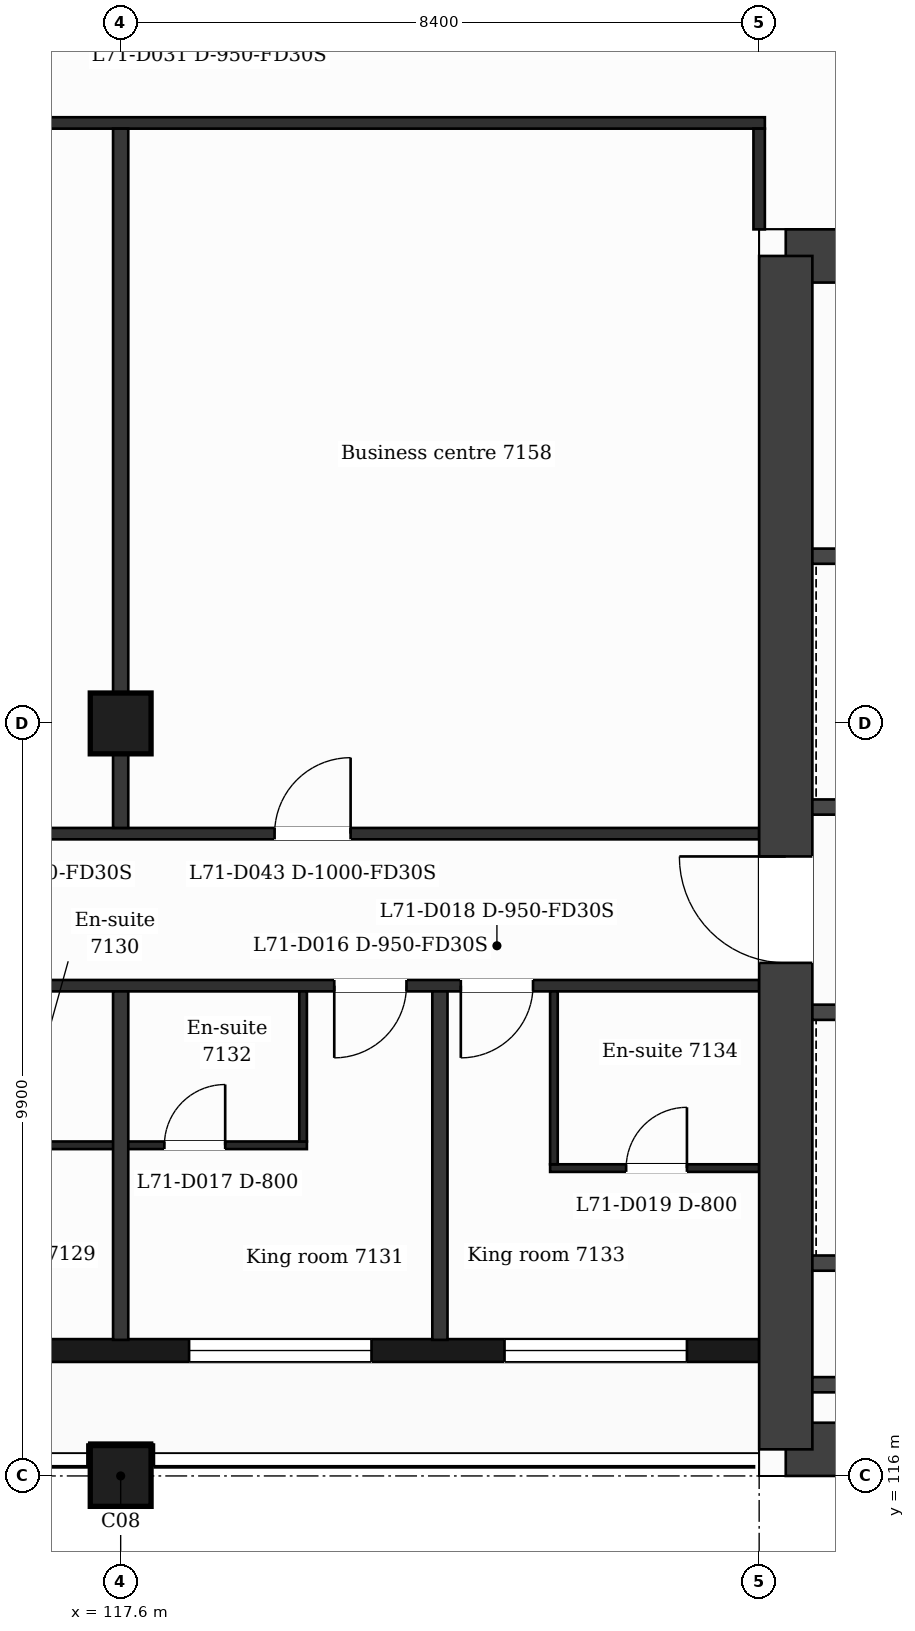
"""IFC4 building model, lengths in metres.
Left out: names, types, materials, properties, quantities, classifications, styles, units other than length and angle.
Written with IfcOpenShell. Run it as: python <this file> out.ifc"""

import sys

from ifc_helpers import new_model, si_unit, direction, frame, frame_2d, origin, origin_2d, place, context, subcontext, project, spatial, rectangle, extrude, element, fill, save


model = new_model("IFC4")
c1 = context("Model", 3, precision=1e-05, world=origin(), true_north=direction((0.0, 1.0)))
c2 = subcontext(c1, "Body", "Model", "MODEL_VIEW")
j1 = project(units=[si_unit("LENGTHUNIT", "METRE"), si_unit("PLANEANGLEUNIT", "RADIAN")], contexts=[c1])
p1 = place(None, origin())
s1 = spatial("IfcSite", under=j1, at=p1, CompositionType="ELEMENT")
p2 = place(p1, origin())
s2 = spatial("IfcBuilding", under=s1, at=p2, CompositionType="ELEMENT")
p3 = place(p2, frame((0.0, 0.0, 292.3)))
s3 = spatial("IfcBuildingStorey", under=s2, at=p3, CompositionType="ELEMENT", Elevation=292.3)
p4 = place(p3, frame((126.35, 132.05, 0.0), z_axis=(0.0, 0.0, 1.0), x_axis=(1.0, 0.0, 0.0)))
e1 = element("IfcWall", 1, at=p4, inside=s3, PredefinedType="SHEAR", context=c2, shape_type="SweptSolid", body=[
    extrude(rectangle(XDim=11.513, YDim=0.7, at=frame_2d((5.757, 0.0))), origin(), (0.0, 0.0, 1.0), 3.7),
])
p5 = place(p4, frame((3.386, 0.0, 0.0)))
e2 = element("IfcOpeningElement", 2, at=p5, cuts=e1, PredefinedType="OPENING", context=c2, shape_type="SweptSolid", body=[
    extrude(rectangle(XDim=1.2, YDim=2.1, at=frame_2d((0.6, 1.05))), frame((0.0, 0.36, 0.0), z_axis=(0.0, -1.0, 0.0), x_axis=(1.0, 0.0, 0.0)), (0.0, 0.0, 1.0), 0.72),
])
p6 = place(p3, frame((139.977, 116.35, 0.0), z_axis=(0.0, 0.0, 1.0), x_axis=(-1.0, 0.0, 0.0)))
e3 = element("IfcWall", 3, at=p6, inside=s3, PredefinedType="SHEAR", context=c2, shape_type="SweptSolid", body=[
    extrude(rectangle(XDim=13.626, YDim=0.7, at=frame_2d((6.813, 0.0))), origin(), (0.0, 0.0, 1.0), 3.7),
])
p7 = place(p3, frame((126.35, 116.35, 0.0), z_axis=(0.0, 0.0, 1.0), x_axis=(0.0, 1.0, 0.0)))
e4 = element("IfcWall", 4, at=p7, inside=s3, PredefinedType="SHEAR", context=c2, shape_type="SweptSolid", body=[
    extrude(rectangle(XDim=15.7, YDim=0.7, at=frame_2d((7.85, 0.0))), origin(), (0.0, 0.0, 1.0), 3.7),
])
p8 = place(p7, frame((6.4, 0.0, 0.0)))
e5 = element("IfcOpeningElement", 5, at=p8, cuts=e4, PredefinedType="OPENING", context=c2, shape_type="SweptSolid", body=[
    extrude(rectangle(XDim=1.4, YDim=2.1, at=frame_2d((0.7, 1.05))), frame((0.0, 0.36, 0.0), z_axis=(0.0, -1.0, 0.0), x_axis=(1.0, 0.0, 0.0)), (0.0, 0.0, 1.0), 0.72),
])
for number, where, z_axis, x_axis in (
    (6, (117.6, 116.0, 0.0), (0.0, 0.0, 1.0), (1.0, 0.0, 0.0)),
    (7, (117.6, 125.9, 0.0), (0.0, 0.0, 1.0), (1.0, 0.0, 0.0)),
):
    element("IfcColumn", number, at=place(p3, frame(where, z_axis=z_axis, x_axis=x_axis)), inside=s3, PredefinedType="COLUMN", context=c2, shape_type="SweptSolid", body=[
        extrude(rectangle(XDim=0.8, YDim=0.8, at=origin_2d()), origin(), (0.0, 0.0, 1.0), 3.7),
    ])
p9 = place(p3, frame((100.8, 117.65, 0.0), z_axis=(0.0, 0.0, 1.0), x_axis=(1.0, 0.0, 0.0)))
e8 = element("IfcWall", 8, at=p9, inside=s3, PredefinedType="SOLIDWALL", context=c2, shape_type="SweptSolid", body=[
    extrude(rectangle(XDim=25.2, YDim=0.3, at=frame_2d((12.6, 0.0))), origin(), (0.0, 0.0, 1.0), 3.38),
])
p10 = place(p9, frame((0.95, 0.0, 0.9)))
e9 = element("IfcOpeningElement", 9, at=p10, cuts=e8, PredefinedType="OPENING", context=c2, shape_type="SweptSolid", body=[
    extrude(rectangle(XDim=2.4, YDim=2.1, at=frame_2d((1.2, 1.05))), frame((0.0, 0.16, 0.0), z_axis=(0.0, -1.0, 0.0), x_axis=(1.0, 0.0, 0.0)), (0.0, 0.0, 1.0), 0.32),
])
p11 = place(p9, frame((5.1, 0.0, 0.9)))
e10 = element("IfcOpeningElement", 10, at=p11, cuts=e8, PredefinedType="OPENING", context=c2, shape_type="SweptSolid", body=[
    extrude(rectangle(XDim=2.4, YDim=2.1, at=frame_2d((1.2, 1.05))), frame((0.0, 0.16, 0.0), z_axis=(0.0, -1.0, 0.0), x_axis=(1.0, 0.0, 0.0)), (0.0, 0.0, 1.0), 0.32),
])
p12 = place(p9, frame((9.9, 0.0, 0.0)))
e11 = element("IfcOpeningElement", 11, at=p12, cuts=e8, PredefinedType="OPENING", context=c2, shape_type="SweptSolid", body=[
    extrude(rectangle(XDim=1.2, YDim=2.4, at=frame_2d((0.6, 1.2))), frame((0.0, 0.16, 0.0), z_axis=(0.0, -1.0, 0.0), x_axis=(1.0, 0.0, 0.0)), (0.0, 0.0, 1.0), 0.32),
])
p13 = place(p9, frame((14.1, 0.0, 0.9)))
e12 = element("IfcOpeningElement", 12, at=p13, cuts=e8, PredefinedType="OPENING", context=c2, shape_type="SweptSolid", body=[
    extrude(rectangle(XDim=1.2, YDim=2.1, at=frame_2d((0.6, 1.05))), frame((0.0, 0.16, 0.0), z_axis=(0.0, -1.0, 0.0), x_axis=(1.0, 0.0, 0.0)), (0.0, 0.0, 1.0), 0.32),
])
p14 = place(p9, frame((17.7, 0.0, 0.9)))
e13 = element("IfcOpeningElement", 13, at=p14, cuts=e8, PredefinedType="OPENING", context=c2, shape_type="SweptSolid", body=[
    extrude(rectangle(XDim=2.4, YDim=2.1, at=frame_2d((1.2, 1.05))), frame((0.0, 0.16, 0.0), z_axis=(0.0, -1.0, 0.0), x_axis=(1.0, 0.0, 0.0)), (0.0, 0.0, 1.0), 0.32),
])
p15 = place(p9, frame((21.85, 0.0, 0.9)))
e14 = element("IfcOpeningElement", 14, at=p15, cuts=e8, PredefinedType="OPENING", context=c2, shape_type="SweptSolid", body=[
    extrude(rectangle(XDim=2.4, YDim=2.1, at=frame_2d((1.2, 1.05))), frame((0.0, 0.16, 0.0), z_axis=(0.0, -1.0, 0.0), x_axis=(1.0, 0.0, 0.0)), (0.0, 0.0, 1.0), 0.32),
])
for number, where, z_axis, x_axis in (
    (15, (126.7, 117.2, 0.0), (0.0, 0.0, 1.0), (1.0, 0.0, 0.0)),
    (16, (126.7, 118.8, 0.0), (0.0, 0.0, 1.0), (1.0, 0.0, 0.0)),
):
    element("IfcWall", number, at=place(p3, frame(where, z_axis=z_axis, x_axis=x_axis)), inside=s3, PredefinedType="PARTITIONING", context=c2, shape_type="SweptSolid", body=[
        extrude(rectangle(XDim=4.873, YDim=0.2, at=frame_2d((2.437, 0.0))), origin(), (0.0, 0.0, 1.0), 3.38),
    ])
p16 = place(p3, frame((123.25, 120.05, 0.0), z_axis=(0.0, 0.0, 1.0), x_axis=(1.0, 0.0, 0.0)))
e17 = element("IfcWall", 17, at=p16, inside=s3, PredefinedType="PARTITIONING", context=c2, shape_type="SweptSolid", body=[
    extrude(rectangle(XDim=2.75, YDim=0.1, at=frame_2d((1.375, 0.0))), origin(), (0.0, 0.0, 1.0), 3.38),
])
p17 = place(p16, frame((1.0, 0.0, 0.0)))
e18 = element("IfcOpeningElement", 18, at=p17, cuts=e17, PredefinedType="OPENING", context=c2, shape_type="SweptSolid", body=[
    extrude(rectangle(XDim=0.8, YDim=2.1, at=frame_2d((0.4, 1.05))), frame((0.0, 0.06, 0.0), z_axis=(0.0, -1.0, 0.0), x_axis=(1.0, 0.0, 0.0)), (0.0, 0.0, 1.0), 0.12),
])
p18 = place(p3, frame((115.45, 120.35, 0.0), z_axis=(0.0, 0.0, 1.0), x_axis=(1.0, 0.0, 0.0)))
e19 = element("IfcWall", 19, at=p18, inside=s3, PredefinedType="PARTITIONING", context=c2, shape_type="SweptSolid", body=[
    extrude(rectangle(XDim=4.6, YDim=0.1, at=frame_2d((2.3, 0.0))), origin(), (0.0, 0.0, 1.0), 3.38),
])
p19 = place(p18, frame((2.725, 0.0, 0.0)))
e20 = element("IfcOpeningElement", 20, at=p19, cuts=e19, PredefinedType="OPENING", context=c2, shape_type="SweptSolid", body=[
    extrude(rectangle(XDim=0.8, YDim=2.1, at=frame_2d((0.4, 1.05))), frame((0.0, 0.06, 0.0), z_axis=(0.0, -1.0, 0.0), x_axis=(1.0, 0.0, 0.0)), (0.0, 0.0, 1.0), 0.12),
])
p20 = place(p3, frame((126.7, 122.1, 0.0), z_axis=(0.0, 0.0, 1.0), x_axis=(1.0, 0.0, 0.0)))
e21 = element("IfcWall", 21, at=p20, inside=s3, PredefinedType="PARTITIONING", context=c2, shape_type="SweptSolid", body=[
    extrude(rectangle(XDim=4.873, YDim=0.2, at=frame_2d((2.437, 0.0))), origin(), (0.0, 0.0, 1.0), 3.38),
])
p21 = place(p20, frame((3.264, 0.0, 0.0)))
e22 = element("IfcOpeningElement", 22, at=p21, cuts=e21, PredefinedType="OPENING", context=c2, shape_type="SweptSolid", body=[
    extrude(rectangle(XDim=1.1, YDim=2.1, at=frame_2d((0.55, 1.05))), frame((0.0, 0.11, 0.0), z_axis=(0.0, -1.0, 0.0), x_axis=(1.0, 0.0, 0.0)), (0.0, 0.0, 1.0), 0.22),
])
p22 = place(p20, frame((0.827, 0.0, 0.0)))
e23 = element("IfcOpeningElement", 23, at=p22, cuts=e21, PredefinedType="OPENING", context=c2, shape_type="SweptSolid", body=[
    extrude(rectangle(XDim=1.1, YDim=2.1, at=frame_2d((0.55, 1.05))), frame((0.0, 0.11, 0.0), z_axis=(0.0, -1.0, 0.0), x_axis=(1.0, 0.0, 0.0)), (0.0, 0.0, 1.0), 0.22),
])
p23 = place(p3, frame((100.8, 122.45, 0.0), z_axis=(0.0, 0.0, 1.0), x_axis=(1.0, 0.0, 0.0)))
e24 = element("IfcWall", 24, at=p23, inside=s3, PredefinedType="PARTITIONING", context=c2, shape_type="SweptSolid", body=[
    extrude(rectangle(XDim=25.2, YDim=0.15, at=frame_2d((12.6, 0.0))), origin(), (0.0, 0.0, 1.0), 3.38),
])
p24 = place(p23, frame((1.6, 0.0, 0.0)))
e25 = element("IfcOpeningElement", 25, at=p24, cuts=e24, PredefinedType="OPENING", context=c2, shape_type="SweptSolid", body=[
    extrude(rectangle(XDim=1.0, YDim=2.1, at=frame_2d((0.5, 1.05))), frame((0.0, 0.085, 0.0), z_axis=(0.0, -1.0, 0.0), x_axis=(1.0, 0.0, 0.0)), (0.0, 0.0, 1.0), 0.17),
])
p25 = place(p23, frame((11.12, 0.0, 0.0)))
e26 = element("IfcOpeningElement", 26, at=p25, cuts=e24, PredefinedType="OPENING", context=c2, shape_type="SweptSolid", body=[
    extrude(rectangle(XDim=0.95, YDim=2.1, at=frame_2d((0.475, 1.05))), frame((0.0, 0.085, 0.0), z_axis=(0.0, -1.0, 0.0), x_axis=(1.0, 0.0, 0.0)), (0.0, 0.0, 1.0), 0.17),
])
p26 = place(p23, frame((13.05, 0.0, 0.0)))
e27 = element("IfcOpeningElement", 27, at=p26, cuts=e24, PredefinedType="OPENING", context=c2, shape_type="SweptSolid", body=[
    extrude(rectangle(XDim=1.0, YDim=2.1, at=frame_2d((0.5, 1.05))), frame((0.0, 0.085, 0.0), z_axis=(0.0, -1.0, 0.0), x_axis=(1.0, 0.0, 0.0)), (0.0, 0.0, 1.0), 0.17),
])
p27 = place(p23, frame((19.61, 0.0, 0.0)))
e28 = element("IfcOpeningElement", 28, at=p27, cuts=e24, PredefinedType="OPENING", context=c2, shape_type="SweptSolid", body=[
    extrude(rectangle(XDim=0.95, YDim=2.1, at=frame_2d((0.475, 1.05))), frame((0.0, 0.085, 0.0), z_axis=(0.0, -1.0, 0.0), x_axis=(1.0, 0.0, 0.0)), (0.0, 0.0, 1.0), 0.17),
])
p28 = place(p23, frame((21.275, 0.0, 0.0)))
e29 = element("IfcOpeningElement", 29, at=p28, cuts=e24, PredefinedType="OPENING", context=c2, shape_type="SweptSolid", body=[
    extrude(rectangle(XDim=0.95, YDim=2.1, at=frame_2d((0.475, 1.05))), frame((0.0, 0.085, 0.0), z_axis=(0.0, -1.0, 0.0), x_axis=(1.0, 0.0, 0.0)), (0.0, 0.0, 1.0), 0.17),
])
p29 = place(p3, frame((100.8, 124.45, 0.0), z_axis=(0.0, 0.0, 1.0), x_axis=(1.0, 0.0, 0.0)))
e30 = element("IfcWall", 30, at=p29, inside=s3, PredefinedType="PARTITIONING", context=c2, shape_type="SweptSolid", body=[
    extrude(rectangle(XDim=25.2, YDim=0.15, at=frame_2d((12.6, 0.0))), origin(), (0.0, 0.0, 1.0), 3.38),
])
p30 = place(p29, frame((1.85, 0.0, 0.0)))
e31 = element("IfcOpeningElement", 31, at=p30, cuts=e30, PredefinedType="OPENING", context=c2, shape_type="SweptSolid", body=[
    extrude(rectangle(XDim=1.0, YDim=2.1, at=frame_2d((0.5, 1.05))), frame((0.0, 0.085, 0.0), z_axis=(0.0, -1.0, 0.0), x_axis=(1.0, 0.0, 0.0)), (0.0, 0.0, 1.0), 0.17),
])
p31 = place(p29, frame((6.425, 0.0, 0.0)))
e32 = element("IfcOpeningElement", 32, at=p31, cuts=e30, PredefinedType="OPENING", context=c2, shape_type="SweptSolid", body=[
    extrude(rectangle(XDim=1.0, YDim=2.1, at=frame_2d((0.5, 1.05))), frame((0.0, 0.085, 0.0), z_axis=(0.0, -1.0, 0.0), x_axis=(1.0, 0.0, 0.0)), (0.0, 0.0, 1.0), 0.17),
])
p32 = place(p29, frame((9.4, 0.0, 0.0)))
e33 = element("IfcOpeningElement", 33, at=p32, cuts=e30, PredefinedType="OPENING", context=c2, shape_type="SweptSolid", body=[
    extrude(rectangle(XDim=1.0, YDim=2.1, at=frame_2d((0.5, 1.05))), frame((0.0, 0.085, 0.0), z_axis=(0.0, -1.0, 0.0), x_axis=(1.0, 0.0, 0.0)), (0.0, 0.0, 1.0), 0.17),
])
p33 = place(p29, frame((14.825, 0.0, 0.0)))
e34 = element("IfcOpeningElement", 34, at=p33, cuts=e30, PredefinedType="OPENING", context=c2, shape_type="SweptSolid", body=[
    extrude(rectangle(XDim=1.0, YDim=2.1, at=frame_2d((0.5, 1.05))), frame((0.0, 0.085, 0.0), z_axis=(0.0, -1.0, 0.0), x_axis=(1.0, 0.0, 0.0)), (0.0, 0.0, 1.0), 0.17),
])
p34 = place(p29, frame((18.825, 0.0, 0.0)))
e35 = element("IfcOpeningElement", 35, at=p34, cuts=e30, PredefinedType="OPENING", context=c2, shape_type="SweptSolid", body=[
    extrude(rectangle(XDim=1.0, YDim=2.1, at=frame_2d((0.5, 1.05))), frame((0.0, 0.085, 0.0), z_axis=(0.0, -1.0, 0.0), x_axis=(1.0, 0.0, 0.0)), (0.0, 0.0, 1.0), 0.17),
])
p35 = place(p3, frame((126.7, 124.8, 0.0), z_axis=(0.0, 0.0, 1.0), x_axis=(1.0, 0.0, 0.0)))
e36 = element("IfcWall", 36, at=p35, inside=s3, PredefinedType="PARTITIONING", context=c2, shape_type="SweptSolid", body=[
    extrude(rectangle(XDim=4.849, YDim=0.2, at=frame_2d((2.424, 0.0))), origin(), (0.0, 0.0, 1.0), 3.38),
])
p36 = place(p35, frame((0.818, 0.0, 0.0)))
e37 = element("IfcOpeningElement", 37, at=p36, cuts=e36, PredefinedType="OPENING", context=c2, shape_type="SweptSolid", body=[
    extrude(rectangle(XDim=1.1, YDim=2.1, at=frame_2d((0.55, 1.05))), frame((0.0, 0.11, 0.0), z_axis=(0.0, -1.0, 0.0), x_axis=(1.0, 0.0, 0.0)), (0.0, 0.0, 1.0), 0.22),
])
p37 = place(p3, frame((126.7, 128.1, 0.0), z_axis=(0.0, 0.0, 1.0), x_axis=(1.0, 0.0, 0.0)))
e38 = element("IfcWall", 38, at=p37, inside=s3, PredefinedType="PARTITIONING", context=c2, shape_type="SweptSolid", body=[
    extrude(rectangle(XDim=4.849, YDim=0.2, at=frame_2d((2.424, 0.0))), origin(), (0.0, 0.0, 1.0), 3.38),
])
p38 = place(p37, frame((3.149, 0.0, 0.0)))
e39 = element("IfcOpeningElement", 39, at=p38, cuts=e38, PredefinedType="OPENING", context=c2, shape_type="SweptSolid", body=[
    extrude(rectangle(XDim=1.1, YDim=2.1, at=frame_2d((0.55, 1.05))), frame((0.0, 0.11, 0.0), z_axis=(0.0, -1.0, 0.0), x_axis=(1.0, 0.0, 0.0)), (0.0, 0.0, 1.0), 0.22),
])
p39 = place(p3, frame((100.725, 133.8, 0.0), z_axis=(0.0, 0.0, 1.0), x_axis=(1.0, 0.0, 0.0)))
e40 = element("IfcWall", 40, at=p39, inside=s3, PredefinedType="PARTITIONING", context=c2, shape_type="SweptSolid", body=[
    extrude(rectangle(XDim=25.35, YDim=0.15, at=frame_2d((12.675, 0.0))), origin(), (0.0, 0.0, 1.0), 3.38),
])
p40 = place(p39, frame((9.825, 0.0, 0.0)))
e41 = element("IfcOpeningElement", 41, at=p40, cuts=e40, PredefinedType="OPENING", context=c2, shape_type="SweptSolid", body=[
    extrude(rectangle(XDim=1.0, YDim=2.1, at=frame_2d((0.5, 1.05))), frame((0.0, 0.085, 0.0), z_axis=(0.0, -1.0, 0.0), x_axis=(1.0, 0.0, 0.0)), (0.0, 0.0, 1.0), 0.17),
])
p41 = place(p3, frame((117.6, 117.79, 0.0), z_axis=(0.0, 0.0, 1.0), x_axis=(0.0, 1.0, 0.0)))
e42 = element("IfcWall", 42, at=p41, inside=s3, PredefinedType="PARTITIONING", context=c2, shape_type="SweptSolid", body=[
    extrude(rectangle(XDim=4.585, YDim=0.2, at=frame_2d((2.292, 0.0))), origin(), (0.0, 0.0, 1.0), 3.38),
])
p42 = place(p3, frame((117.6, 124.525, 0.0), z_axis=(0.0, 0.0, 1.0), x_axis=(0.0, 1.0, 0.0)))
e43 = element("IfcWall", 43, at=p42, inside=s3, PredefinedType="PARTITIONING", context=c2, shape_type="SweptSolid", body=[
    extrude(rectangle(XDim=9.2, YDim=0.2, at=frame_2d((4.6, 0.0))), origin(), (0.0, 0.0, 1.0), 3.38),
])
p43 = place(p3, frame((120.0, 120.4, 0.0), z_axis=(0.0, 0.0, 1.0), x_axis=(0.0, 1.0, 0.0)))
e44 = element("IfcWall", 44, at=p43, inside=s3, PredefinedType="PARTITIONING", context=c2, shape_type="SweptSolid", body=[
    extrude(rectangle(XDim=1.975, YDim=0.1, at=frame_2d((0.988, 0.0))), origin(), (0.0, 0.0, 1.0), 3.38),
])
p44 = place(p3, frame((121.8, 117.79, 0.0), z_axis=(0.0, 0.0, 1.0), x_axis=(0.0, 1.0, 0.0)))
e45 = element("IfcWall", 45, at=p44, inside=s3, PredefinedType="PARTITIONING", context=c2, shape_type="SweptSolid", body=[
    extrude(rectangle(XDim=4.585, YDim=0.2, at=frame_2d((2.292, 0.0))), origin(), (0.0, 0.0, 1.0), 3.38),
])
p45 = place(p3, frame((123.3, 120.1, 0.0), z_axis=(0.0, 0.0, 1.0), x_axis=(0.0, 1.0, 0.0)))
e46 = element("IfcWall", 46, at=p45, inside=s3, PredefinedType="PARTITIONING", context=c2, shape_type="SweptSolid", body=[
    extrude(rectangle(XDim=2.275, YDim=0.1, at=frame_2d((1.137, 0.0))), origin(), (0.0, 0.0, 1.0), 3.38),
])
p46 = place(p3, frame((126.0, 132.4, 0.0), z_axis=(0.0, 0.0, 1.0), x_axis=(0.0, 1.0, 0.0)))
e47 = element("IfcWall", 47, at=p46, inside=s3, PredefinedType="PARTITIONING", context=c2, shape_type="SweptSolid", body=[
    extrude(rectangle(XDim=1.325, YDim=0.15, at=frame_2d((0.663, 0.0))), origin(), (0.0, 0.0, 1.0), 3.38),
])
p47 = place(p14, origin())
e48 = element("IfcWindow", 48, at=p47, inside=s3, PartitioningType="SINGLE_PANEL", PredefinedType="WINDOW", context=c2, shape_type="SweptSolid", body=[
    extrude(rectangle(XDim=2.4, YDim=2.1, at=frame_2d((1.2, 1.05))), frame((0.0, 0.03, 0.0), z_axis=(0.0, -1.0, 0.0), x_axis=(1.0, 0.0, 0.0)), (0.0, 0.0, 1.0), 0.06),
])
fill(e13, e48)
p48 = place(p15, origin())
e49 = element("IfcWindow", 49, at=p48, inside=s3, PartitioningType="SINGLE_PANEL", PredefinedType="WINDOW", context=c2, shape_type="SweptSolid", body=[
    extrude(rectangle(XDim=2.4, YDim=2.1, at=frame_2d((1.2, 1.05))), frame((0.0, 0.03, 0.0), z_axis=(0.0, -1.0, 0.0), x_axis=(1.0, 0.0, 0.0)), (0.0, 0.0, 1.0), 0.06),
])
fill(e14, e49)
p49 = place(p27, origin())
e50 = element("IfcDoor", 50, at=p49, inside=s3, OperationType="SINGLE_SWING_LEFT", PredefinedType="DOOR", context=c2, shape_type="SweptSolid", body=[
    extrude(rectangle(XDim=0.95, YDim=2.1, at=frame_2d((0.475, 1.05))), frame((0.0, 0.025, 0.0), z_axis=(0.0, -1.0, 0.0), x_axis=(1.0, 0.0, 0.0)), (0.0, 0.0, 1.0), 0.05),
])
fill(e28, e50)
p50 = place(p19, origin())
e51 = element("IfcDoor", 51, at=p50, inside=s3, OperationType="SINGLE_SWING_RIGHT", PredefinedType="DOOR", context=c2, shape_type="SweptSolid", body=[
    extrude(rectangle(XDim=0.8, YDim=2.1, at=frame_2d((0.4, 1.05))), frame((0.0, 0.025, 0.0), z_axis=(0.0, -1.0, 0.0), x_axis=(1.0, 0.0, 0.0)), (0.0, 0.0, 1.0), 0.05),
])
fill(e20, e51)
p51 = place(p28, origin())
e52 = element("IfcDoor", 52, at=p51, inside=s3, OperationType="SINGLE_SWING_LEFT", PredefinedType="DOOR", context=c2, shape_type="SweptSolid", body=[
    extrude(rectangle(XDim=0.95, YDim=2.1, at=frame_2d((0.475, 1.05))), frame((0.0, 0.025, 0.0), z_axis=(0.0, -1.0, 0.0), x_axis=(1.0, 0.0, 0.0)), (0.0, 0.0, 1.0), 0.05),
])
fill(e29, e52)
p52 = place(p17, origin())
e53 = element("IfcDoor", 53, at=p52, inside=s3, OperationType="SINGLE_SWING_RIGHT", PredefinedType="DOOR", context=c2, shape_type="SweptSolid", body=[
    extrude(rectangle(XDim=0.8, YDim=2.1, at=frame_2d((0.4, 1.05))), frame((0.0, 0.025, 0.0), z_axis=(0.0, -1.0, 0.0), x_axis=(1.0, 0.0, 0.0)), (0.0, 0.0, 1.0), 0.05),
])
fill(e18, e53)
p53 = place(p34, origin())
e54 = element("IfcDoor", 54, at=p53, inside=s3, OperationType="SINGLE_SWING_RIGHT", PredefinedType="DOOR", context=c2, shape_type="SweptSolid", body=[
    extrude(rectangle(XDim=1.0, YDim=2.1, at=frame_2d((0.5, 1.05))), frame((0.0, 0.025, 0.0), z_axis=(0.0, -1.0, 0.0), x_axis=(1.0, 0.0, 0.0)), (0.0, 0.0, 1.0), 0.05),
])
fill(e35, e54)
p54 = place(p8, origin())
e55 = element("IfcDoor", 55, at=p54, inside=s3, OperationType="SINGLE_SWING_RIGHT", PredefinedType="DOOR", context=c2, shape_type="SweptSolid", body=[
    extrude(rectangle(XDim=1.4, YDim=2.1, at=frame_2d((0.7, 1.05))), frame((0.0, 0.025, 0.0), z_axis=(0.0, -1.0, 0.0), x_axis=(1.0, 0.0, 0.0)), (0.0, 0.0, 1.0), 0.05),
])
fill(e5, e55)
save(model, sys.argv[1])
